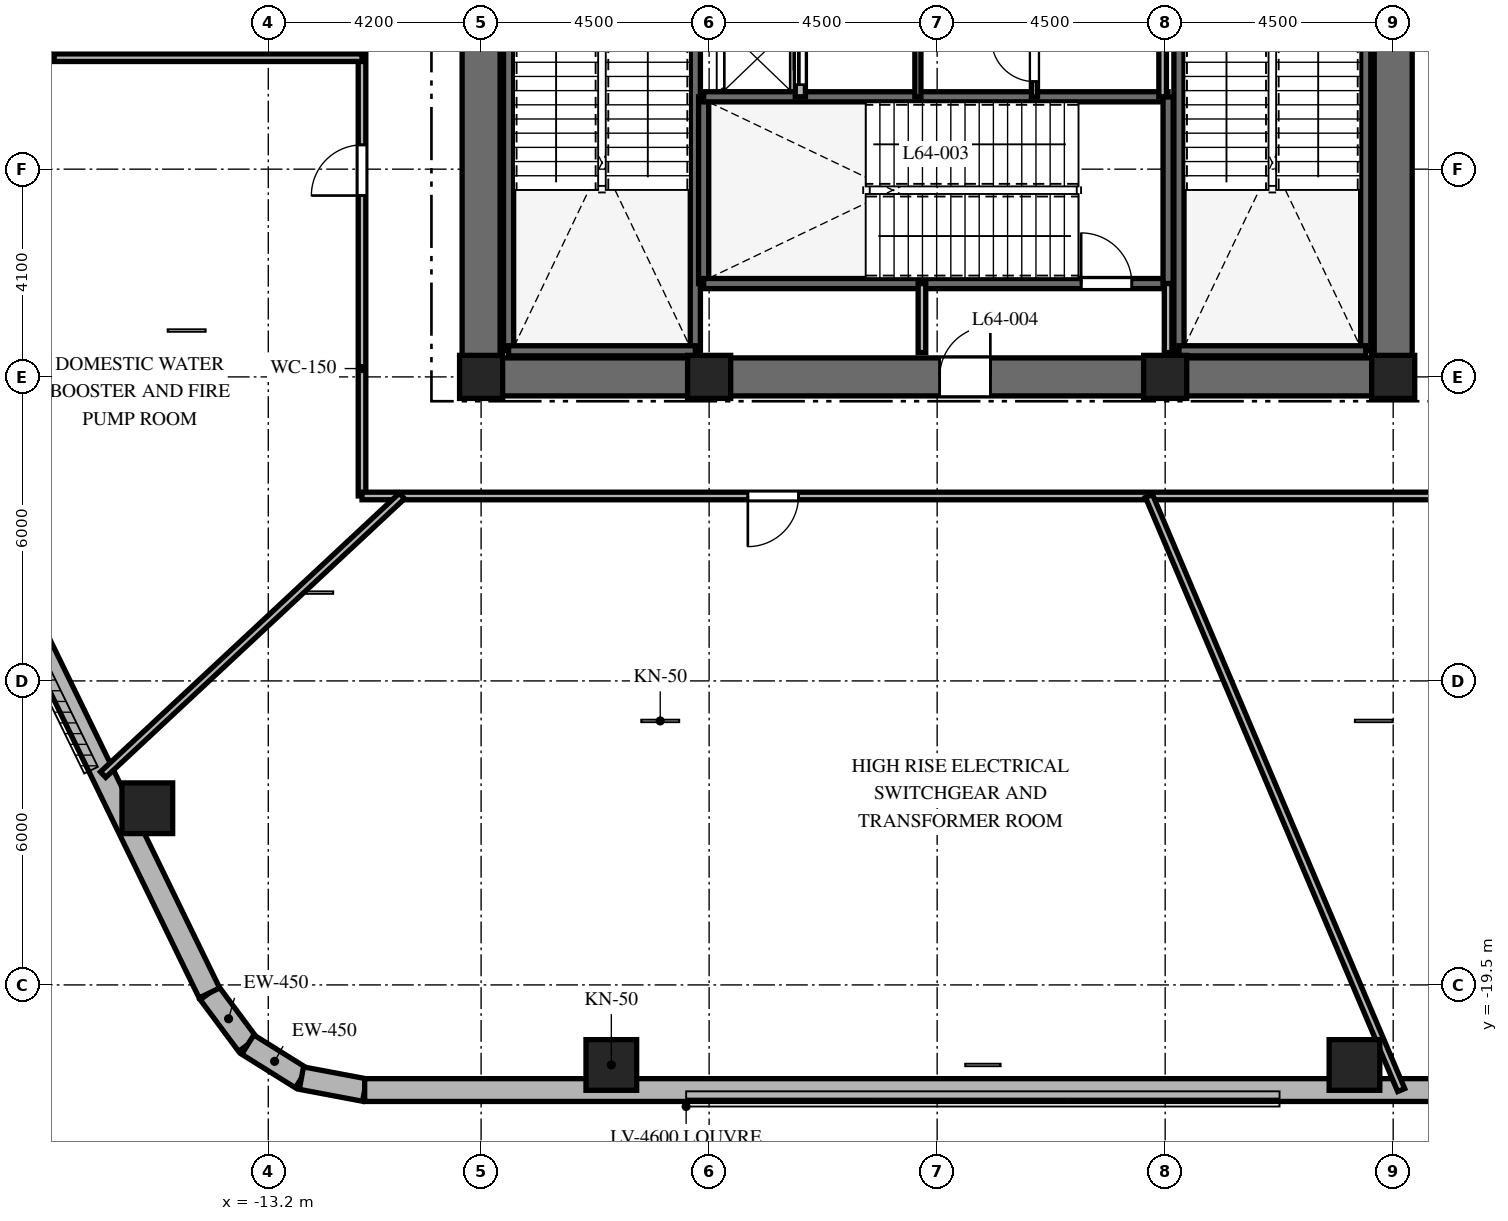
"""IFC4 building model, lengths in metres.
Left out: names, types, materials, properties, quantities, classifications, styles, units other than length and angle.
Written with IfcOpenShell. Run it as: python <this file> out.ifc"""

import sys

from ifc_helpers import new_model, si_unit, direction, frame, frame_2d, origin, origin_2d, place, context, subcontext, project, spatial, rectangle, extrude, element, fill, save


model = new_model("IFC4")
c1 = context("Model", 3, precision=1e-05, world=origin(), true_north=direction((0.0, 1.0)))
c2 = subcontext(c1, "Body", "Model", "MODEL_VIEW")
j1 = project(units=[si_unit("LENGTHUNIT", "METRE"), si_unit("PLANEANGLEUNIT", "RADIAN")], contexts=[c1])
p1 = place(None, origin())
s1 = spatial("IfcSite", under=j1, at=p1, CompositionType="ELEMENT")
p2 = place(p1, origin())
s2 = spatial("IfcBuilding", under=s1, at=p2, CompositionType="ELEMENT")
p3 = place(p2, frame((0.0, 0.0, 255.9)))
s3 = spatial("IfcBuildingStorey", under=s2, at=p3, CompositionType="ELEMENT", Elevation=255.9)
p4 = place(p3, frame((-9.375, -7.5, 0.0), z_axis=(0.0, 0.0, 1.0), x_axis=(1.0, 0.0, 0.0)))
e1 = element("IfcWall", 1, at=p4, inside=s3, PredefinedType="SHEAR", context=c2, shape_type="SweptSolid", body=[
    extrude(rectangle(XDim=18.75, YDim=0.75, at=frame_2d((9.375, 0.0))), origin(), (0.0, 0.0, 1.0), 5.4),
])
p5 = place(p4, frame((9.425, 0.0, 0.0)))
e2 = element("IfcOpeningElement", 2, at=p5, cuts=e1, PredefinedType="OPENING", context=c2, shape_type="SweptSolid", body=[
    extrude(rectangle(XDim=1.0, YDim=2.15, at=frame_2d((0.5, 1.075))), frame((0.0, 0.385, 0.0), z_axis=(0.0, -1.0, 0.0), x_axis=(1.0, 0.0, 0.0)), (0.0, 0.0, 1.0), 0.77),
])
p6 = place(p3, frame((-9.0, -7.125, 0.0), z_axis=(0.0, 0.0, 1.0), x_axis=(0.0, 1.0, 0.0)))
e3 = element("IfcWall", 3, at=p6, inside=s3, PredefinedType="SHEAR", context=c2, shape_type="SweptSolid", body=[
    extrude(rectangle(XDim=14.25, YDim=0.75, at=frame_2d((7.125, 0.0))), origin(), (0.0, 0.0, 1.0), 5.4),
])
p7 = place(p6, frame((10.25, 0.0, 0.0)))
e4 = element("IfcOpeningElement", 4, at=p7, cuts=e3, PredefinedType="OPENING", context=c2, shape_type="SweptSolid", body=[
    extrude(rectangle(XDim=1.05, YDim=2.15, at=frame_2d((0.525, 1.075))), frame((0.0, 0.385, 0.0), z_axis=(0.0, -1.0, 0.0), x_axis=(1.0, 0.0, 0.0)), (0.0, 0.0, 1.0), 0.77),
])
p8 = place(p3, frame((9.0, -7.125, 0.0), z_axis=(0.0, 0.0, 1.0), x_axis=(0.0, 1.0, 0.0)))
e5 = element("IfcWall", 5, at=p8, inside=s3, PredefinedType="SHEAR", context=c2, shape_type="SweptSolid", body=[
    extrude(rectangle(XDim=14.25, YDim=0.75, at=frame_2d((7.125, 0.0))), origin(), (0.0, 0.0, 1.0), 5.4),
])
p9 = place(p8, frame((10.25, 0.0, 0.0)))
e6 = element("IfcOpeningElement", 6, at=p9, cuts=e5, PredefinedType="OPENING", context=c2, shape_type="SweptSolid", body=[
    extrude(rectangle(XDim=1.05, YDim=2.15, at=frame_2d((0.525, 1.075))), frame((0.0, 0.385, 0.0), z_axis=(0.0, -1.0, 0.0), x_axis=(1.0, 0.0, 0.0)), (0.0, 0.0, 1.0), 0.77),
])
for number, where, z_axis, x_axis in (
    (7, (-8.458, -6.985, 0.0), (0.0, 0.0, 1.0), (0.0, 1.0, 0.0)),
    (8, (-4.772, -6.985, 0.0), (0.0, 0.0, 1.0), (0.0, 1.0, 0.0)),
):
    element("IfcWall", number, at=place(p3, frame(where, z_axis=z_axis, x_axis=x_axis)), inside=s3, PredefinedType="SHEAR", context=c2, shape_type="SweptSolid", body=[
        extrude(rectangle(XDim=9.143, YDim=0.2, at=frame_2d((4.572, 0.0))), origin(), (0.0, 0.0, 1.0), 5.4),
    ])
p10 = place(p3, frame((-8.458, -6.985, 0.0), z_axis=(0.0, 0.0, 1.0), x_axis=(1.0, 0.0, 0.0)))
e9 = element("IfcWall", 9, at=p10, inside=s3, PredefinedType="SHEAR", context=c2, shape_type="SweptSolid", body=[
    extrude(rectangle(XDim=3.686, YDim=0.2, at=frame_2d((1.843, 0.0))), origin(), (0.0, 0.0, 1.0), 5.4),
])
for number, where, z_axis, x_axis in (
    (10, (4.772, -6.985, 0.0), (0.0, 0.0, 1.0), (0.0, 1.0, 0.0)),
    (11, (8.458, -6.985, 0.0), (0.0, 0.0, 1.0), (0.0, 1.0, 0.0)),
):
    element("IfcWall", number, at=place(p3, frame(where, z_axis=z_axis, x_axis=x_axis)), inside=s3, PredefinedType="SHEAR", context=c2, shape_type="SweptSolid", body=[
        extrude(rectangle(XDim=9.143, YDim=0.2, at=frame_2d((4.572, 0.0))), origin(), (0.0, 0.0, 1.0), 5.4),
    ])
for number, where, z_axis, x_axis in (
    (12, (4.772, -6.985, 0.0), (0.0, 0.0, 1.0), (1.0, 0.0, 0.0)),
    (13, (-4.608, -5.658, 0.0), (0.0, 0.0, 1.0), (0.0, 1.0, 0.0)),
):
    element("IfcWall", number, at=place(p3, frame(where, z_axis=z_axis, x_axis=x_axis)), inside=s3, PredefinedType="SHEAR", context=c2, shape_type="SweptSolid", body=[
        extrude(rectangle(XDim=3.686, YDim=0.2, at=frame_2d((1.843, 0.0))), origin(), (0.0, 0.0, 1.0), 5.4),
    ])
p11 = place(p3, frame((-4.608, -5.658, 0.0), z_axis=(0.0, 0.0, 1.0), x_axis=(1.0, 0.0, 0.0)))
e14 = element("IfcWall", 14, at=p11, inside=s3, PredefinedType="SHEAR", context=c2, shape_type="SweptSolid", body=[
    extrude(rectangle(XDim=9.166, YDim=0.2, at=frame_2d((4.583, 0.0))), origin(), (0.0, 0.0, 1.0), 5.4),
])
p12 = place(p11, frame((7.45, 0.0, 0.0)))
e15 = element("IfcOpeningElement", 15, at=p12, cuts=e14, PredefinedType="OPENING", context=c2, shape_type="SweptSolid", body=[
    extrude(rectangle(XDim=1.0, YDim=2.15, at=frame_2d((0.5, 1.075))), frame((0.0, 0.11, 0.0), z_axis=(0.0, -1.0, 0.0), x_axis=(1.0, 0.0, 0.0)), (0.0, 0.0, 1.0), 0.22),
])
p13 = place(p3, frame((-4.608, -1.972, 0.0), z_axis=(0.0, 0.0, 1.0), x_axis=(1.0, 0.0, 0.0)))
e16 = element("IfcWall", 16, at=p13, inside=s3, PredefinedType="SHEAR", context=c2, shape_type="SweptSolid", body=[
    extrude(rectangle(XDim=9.166, YDim=0.2, at=frame_2d((4.583, 0.0))), origin(), (0.0, 0.0, 1.0), 5.4),
])
p14 = place(p3, frame((4.558, -5.658, 0.0), z_axis=(0.0, 0.0, 1.0), x_axis=(0.0, 1.0, 0.0)))
e17 = element("IfcWall", 17, at=p14, inside=s3, PredefinedType="SHEAR", context=c2, shape_type="SweptSolid", body=[
    extrude(rectangle(XDim=3.686, YDim=0.2, at=frame_2d((1.843, 0.0))), origin(), (0.0, 0.0, 1.0), 5.4),
])
for number, where, z_axis, x_axis in (
    (18, (-9.0, -7.5, 0.0), (0.0, 0.0, 1.0), (1.0, 0.0, 0.0)),
    (19, (-4.5, -7.5, 0.0), (0.0, 0.0, 1.0), (1.0, 0.0, 0.0)),
    (20, (4.5, -7.5, 0.0), (0.0, 0.0, 1.0), (1.0, 0.0, 0.0)),
    (21, (9.0, -7.5, 0.0), (0.0, 0.0, 1.0), (1.0, 0.0, 0.0)),
):
    element("IfcColumn", number, at=place(p3, frame(where, z_axis=z_axis, x_axis=x_axis)), inside=s3, PredefinedType="COLUMN", context=c2, shape_type="SweptSolid", body=[
        extrude(rectangle(XDim=0.85, YDim=0.85, at=origin_2d()), origin(), (0.0, 0.0, 1.0), 5.4),
    ])
for number, where, z_axis, x_axis in (
    (22, (-6.43, -21.08, 0.0), (0.0, 0.0, 1.0), (1.0, 0.0, 0.0)),
    (23, (8.236, -21.08, 0.0), (0.0, 0.0, 1.0), (1.0, 0.0, 0.0)),
    (24, (-15.587, -16.013, 0.0), (0.0, 0.0, 1.0), (1.0, 0.0, 0.0)),
):
    element("IfcColumn", number, at=place(p3, frame(where, z_axis=z_axis, x_axis=x_axis)), inside=s3, PredefinedType="COLUMN", context=c2, shape_type="SweptSolid", body=[
        extrude(rectangle(XDim=1.0, YDim=1.0, at=origin_2d()), origin(), (0.0, 0.0, 1.0), 5.4),
    ])
p15 = place(p3, frame((-14.362, -19.658, 0.0), z_axis=(0.0, 0.0, 1.0), x_axis=(0.596642462792, -0.80250717853, 0.0)))
e25 = element("IfcWall", 25, at=p15, inside=s3, PredefinedType="SOLIDWALL", context=c2, shape_type="SweptSolid", body=[
    extrude(rectangle(XDim=1.27, YDim=0.45, at=frame_2d((0.635, 0.0))), origin(), (0.0, 0.0, 1.0), 5.1),
])
p16 = place(p3, frame((-13.604, -20.678, 0.0), z_axis=(0.0, 0.0, 1.0), x_axis=(0.847910404124, -0.53013955387, 0.0)))
e26 = element("IfcWall", 26, at=p16, inside=s3, PredefinedType="SOLIDWALL", context=c2, shape_type="SweptSolid", body=[
    extrude(rectangle(XDim=1.249, YDim=0.45, at=frame_2d((0.624, 0.0))), origin(), (0.0, 0.0, 1.0), 5.1),
])
p17 = place(p3, frame((-12.546, -21.34, 0.0), z_axis=(0.0, 0.0, 1.0), x_axis=(0.982686750835, -0.18527479519, 0.0)))
e27 = element("IfcWall", 27, at=p17, inside=s3, PredefinedType="SOLIDWALL", context=c2, shape_type="SweptSolid", body=[
    extrude(rectangle(XDim=1.27, YDim=0.45, at=frame_2d((0.635, 0.0))), origin(), (0.0, 0.0, 1.0), 5.1),
])
p18 = place(p3, frame((-11.298, -21.575, 0.0), z_axis=(0.0, 0.0, 1.0), x_axis=(1.0, 0.0, 0.0)))
e28 = element("IfcWall", 28, at=p18, inside=s3, PredefinedType="SOLIDWALL", context=c2, shape_type="SweptSolid", body=[
    extrude(rectangle(XDim=24.399, YDim=0.45, at=frame_2d((12.2, 0.0))), origin(), (0.0, 0.0, 1.0), 5.1),
])
p19 = place(p3, frame((-22.74, -2.452, 0.0), z_axis=(0.0, 0.0, 1.0), x_axis=(0.437753424814, -0.899095066755, 0.0)))
e29 = element("IfcWall", 29, at=p19, inside=s3, PredefinedType="SOLIDWALL", context=c2, shape_type="SweptSolid", body=[
    extrude(rectangle(XDim=19.137, YDim=0.45, at=frame_2d((9.569, 0.0))), origin(), (0.0, 0.0, 1.0), 5.1),
])
for number, where, z_axis, x_axis in (
    (30, (-0.3, -7.02, 0.0), (0.0, 0.0, 1.0), (0.0, 1.0, 0.0)),
    (31, (4.558, -7.02, 0.0), (0.0, 0.0, 1.0), (0.0, 1.0, 0.0)),
):
    element("IfcWall", number, at=place(p3, frame(where, z_axis=z_axis, x_axis=x_axis)), inside=s3, PredefinedType="PARTITIONING", context=c2, shape_type="SweptSolid", body=[
        extrude(rectangle(XDim=1.362, YDim=0.15, at=frame_2d((0.681, 0.0))), origin(), (0.0, 0.0, 1.0), 5.1),
    ])
p20 = place(p3, frame((-2.7, -1.972, 0.0), z_axis=(0.0, 0.0, 1.0), x_axis=(0.0, 1.0, 0.0)))
e32 = element("IfcWall", 32, at=p20, inside=s3, PredefinedType="PARTITIONING", context=c2, shape_type="SweptSolid", body=[
    extrude(rectangle(XDim=1.472, YDim=0.2, at=frame_2d((0.736, 0.0))), origin(), (0.0, 0.0, 1.0), 5.1),
])
p21 = place(p20, frame((0.24, 0.0, 0.0)))
e33 = element("IfcOpeningElement", 33, at=p21, cuts=e32, PredefinedType="OPENING", context=c2, shape_type="SweptSolid", body=[
    extrude(rectangle(XDim=1.0, YDim=2.2, at=frame_2d((0.5, 1.1))), frame((0.0, 0.11, 0.0), z_axis=(0.0, -1.0, 0.0), x_axis=(1.0, 0.0, 0.0)), (0.0, 0.0, 1.0), 0.22),
])
p22 = place(p3, frame((4.45, -1.972, 0.0), z_axis=(0.0, 0.0, 1.0), x_axis=(0.0, 1.0, 0.0)))
e34 = element("IfcWall", 34, at=p22, inside=s3, PredefinedType="PARTITIONING", context=c2, shape_type="SweptSolid", body=[
    extrude(rectangle(XDim=4.222, YDim=0.15, at=frame_2d((2.111, 0.0))), origin(), (0.0, 0.0, 1.0), 5.1),
])
p23 = place(p3, frame((-0.38, -1.972, 0.0), z_axis=(0.0, 0.0, 1.0), x_axis=(0.0, 1.0, 0.0)))
e35 = element("IfcWall", 35, at=p23, inside=s3, PredefinedType="PARTITIONING", context=c2, shape_type="SweptSolid", body=[
    extrude(rectangle(XDim=1.472, YDim=0.12, at=frame_2d((0.736, 0.0))), origin(), (0.0, 0.0, 1.0), 5.1),
])
p24 = place(p3, frame((1.92, -1.972, 0.0), z_axis=(0.0, 0.0, 1.0), x_axis=(0.0, 1.0, 0.0)))
e36 = element("IfcWall", 36, at=p24, inside=s3, PredefinedType="PARTITIONING", context=c2, shape_type="SweptSolid", body=[
    extrude(rectangle(XDim=1.472, YDim=0.12, at=frame_2d((0.736, 0.0))), origin(), (0.0, 0.0, 1.0), 5.1),
])
p25 = place(p24, frame((0.3, 0.0, 0.0)))
e37 = element("IfcOpeningElement", 37, at=p25, cuts=e36, PredefinedType="OPENING", context=c2, shape_type="SweptSolid", body=[
    extrude(rectangle(XDim=0.85, YDim=2.03, at=frame_2d((0.425, 1.015))), frame((0.0, 0.07, 0.0), z_axis=(0.0, -1.0, 0.0), x_axis=(1.0, 0.0, 0.0)), (0.0, 0.0, 1.0), 0.14),
])
p26 = place(p3, frame((-11.35, -9.85, 0.0), z_axis=(0.0, 0.0, 1.0), x_axis=(0.0, 1.0, 0.0)))
e38 = element("IfcWall", 38, at=p26, inside=s3, PredefinedType="PARTITIONING", context=c2, shape_type="SweptSolid", body=[
    extrude(rectangle(XDim=19.7, YDim=0.15, at=frame_2d((9.85, 0.0))), origin(), (0.0, 0.0, 1.0), 3.29),
])
p27 = place(p26, frame((10.825, 0.0, 0.0)))
e39 = element("IfcOpeningElement", 39, at=p27, cuts=e38, PredefinedType="OPENING", context=c2, shape_type="SweptSolid", body=[
    extrude(rectangle(XDim=1.05, YDim=2.15, at=frame_2d((0.525, 1.075))), frame((0.0, 0.085, 0.0), z_axis=(0.0, -1.0, 0.0), x_axis=(1.0, 0.0, 0.0)), (0.0, 0.0, 1.0), 0.17),
])
p28 = place(p26, frame((17.047, 0.0, 0.0)))
e40 = element("IfcOpeningElement", 40, at=p28, cuts=e38, PredefinedType="OPENING", context=c2, shape_type="SweptSolid", body=[
    extrude(rectangle(XDim=1.0, YDim=2.15, at=frame_2d((0.5, 1.075))), frame((0.0, 0.085, 0.0), z_axis=(0.0, -1.0, 0.0), x_axis=(1.0, 0.0, 0.0)), (0.0, 0.0, 1.0), 0.17),
])
p29 = place(p26, frame((5.929, 0.0, 0.0)))
e41 = element("IfcOpeningElement", 41, at=p29, cuts=e38, PredefinedType="OPENING", context=c2, shape_type="SweptSolid", body=[
    extrude(rectangle(XDim=1.0, YDim=2.15, at=frame_2d((0.5, 1.075))), frame((0.0, 0.085, 0.0), z_axis=(0.0, -1.0, 0.0), x_axis=(1.0, 0.0, 0.0)), (0.0, 0.0, 1.0), 0.17),
])
p30 = place(p3, frame((11.35, -9.85, 0.0), z_axis=(0.0, 0.0, 1.0), x_axis=(-1.0, 0.0, 0.0)))
e42 = element("IfcWall", 42, at=p30, inside=s3, PredefinedType="PARTITIONING", context=c2, shape_type="SweptSolid", body=[
    extrude(rectangle(XDim=22.7, YDim=0.15, at=frame_2d((11.35, 0.0))), origin(), (0.0, 0.0, 1.0), 3.29),
])
p31 = place(p30, frame((14.086, 0.0, 0.0)))
e43 = element("IfcOpeningElement", 43, at=p31, cuts=e42, PredefinedType="OPENING", context=c2, shape_type="SweptSolid", body=[
    extrude(rectangle(XDim=1.0, YDim=2.15, at=frame_2d((0.5, 1.075))), frame((0.0, 0.085, 0.0), z_axis=(0.0, -1.0, 0.0), x_axis=(1.0, 0.0, 0.0)), (0.0, 0.0, 1.0), 0.17),
])
p32 = place(p3, frame((-17.5, -1.2, 0.0), z_axis=(0.0, 0.0, 1.0), x_axis=(1.0, 0.0, 0.0)))
e44 = element("IfcWall", 44, at=p32, inside=s3, PredefinedType="PARTITIONING", context=c2, shape_type="SweptSolid", body=[
    extrude(rectangle(XDim=6.15, YDim=0.15, at=frame_2d((3.075, 0.0))), origin(), (0.0, 0.0, 1.0), 4.541),
])
p33 = place(p3, frame((-17.5, -1.2, 0.0), z_axis=(0.0, 0.0, 1.0), x_axis=(0.0, 1.0, 0.0)))
e45 = element("IfcWall", 45, at=p33, inside=s3, PredefinedType="PARTITIONING", context=c2, shape_type="SweptSolid", body=[
    extrude(rectangle(XDim=5.4, YDim=0.15, at=frame_2d((2.7, 0.0))), origin(), (0.0, 0.0, 1.0), 3.29),
])
p34 = place(p3, frame((-10.563, -9.85, 0.0), z_axis=(0.0, 0.0, 1.0), x_axis=(-0.731351201167, -0.682001041459, 0.0)))
e46 = element("IfcWall", 46, at=p34, inside=s3, PredefinedType="PARTITIONING", context=c2, shape_type="SweptSolid", body=[
    extrude(rectangle(XDim=8.064, YDim=0.15, at=frame_2d((4.032, 0.0))), origin(), (0.0, 0.0, 1.0), 3.29),
])
p35 = place(p3, frame((4.181, -9.85, 0.0), z_axis=(0.0, 0.0, 1.0), x_axis=(0.390724582578, -0.920507631999, 0.0)))
e47 = element("IfcWall", 47, at=p35, inside=s3, PredefinedType="PARTITIONING", context=c2, shape_type="SweptSolid", body=[
    extrude(rectangle(XDim=12.737, YDim=0.15, at=frame_2d((6.369, 0.0))), origin(), (0.0, 0.0, 1.0), 3.29),
])
p36 = place(p12, origin())
e48 = element("IfcDoor", 48, at=p36, inside=s3, OperationType="SINGLE_SWING_LEFT", PredefinedType="DOOR", context=c2, shape_type="SweptSolid", body=[
    extrude(rectangle(XDim=1.0, YDim=2.15, at=frame_2d((0.5, 1.075))), frame((0.0, 0.025, 0.0), z_axis=(0.0, -1.0, 0.0), x_axis=(1.0, 0.0, 0.0)), (0.0, 0.0, 1.0), 0.05),
])
fill(e15, e48)
p37 = place(p5, origin())
e49 = element("IfcDoor", 49, at=p37, inside=s3, OperationType="SINGLE_SWING_RIGHT", PredefinedType="DOOR", context=c2, shape_type="SweptSolid", body=[
    extrude(rectangle(XDim=1.0, YDim=2.15, at=frame_2d((0.5, 1.075))), frame((0.0, 0.025, 0.0), z_axis=(0.0, -1.0, 0.0), x_axis=(1.0, 0.0, 0.0)), (0.0, 0.0, 1.0), 0.05),
])
fill(e2, e49)
p38 = place(p21, origin())
e50 = element("IfcDoor", 50, at=p38, inside=s3, OperationType="SLIDING_TO_LEFT", PredefinedType="DOOR", context=c2, shape_type="SweptSolid", body=[
    extrude(rectangle(XDim=1.0, YDim=2.2, at=frame_2d((0.5, 1.1))), frame((0.0, 0.025, 0.0), z_axis=(0.0, -1.0, 0.0), x_axis=(1.0, 0.0, 0.0)), (0.0, 0.0, 1.0), 0.05),
])
fill(e33, e50)
p39 = place(p25, origin())
e51 = element("IfcDoor", 51, at=p39, inside=s3, OperationType="SINGLE_SWING_RIGHT", PredefinedType="DOOR", context=c2, shape_type="SweptSolid", body=[
    extrude(rectangle(XDim=0.85, YDim=2.03, at=frame_2d((0.425, 1.015))), frame((0.0, 0.025, 0.0), z_axis=(0.0, -1.0, 0.0), x_axis=(1.0, 0.0, 0.0)), (0.0, 0.0, 1.0), 0.05),
])
fill(e37, e51)
p40 = place(p29, origin())
e52 = element("IfcDoor", 52, at=p40, inside=s3, OperationType="SINGLE_SWING_LEFT", PredefinedType="DOOR", context=c2, shape_type="SweptSolid", body=[
    extrude(rectangle(XDim=1.0, YDim=2.15, at=frame_2d((0.5, 1.075))), frame((0.0, 0.025, 0.0), z_axis=(0.0, -1.0, 0.0), x_axis=(1.0, 0.0, 0.0)), (0.0, 0.0, 1.0), 0.05),
])
fill(e41, e52)
p41 = place(p31, origin())
e53 = element("IfcDoor", 53, at=p41, inside=s3, OperationType="SINGLE_SWING_RIGHT", PredefinedType="DOOR", context=c2, shape_type="SweptSolid", body=[
    extrude(rectangle(XDim=1.0, YDim=2.15, at=frame_2d((0.5, 1.075))), frame((0.0, 0.025, 0.0), z_axis=(0.0, -1.0, 0.0), x_axis=(1.0, 0.0, 0.0)), (0.0, 0.0, 1.0), 0.05),
])
fill(e43, e53)
save(model, sys.argv[1])
